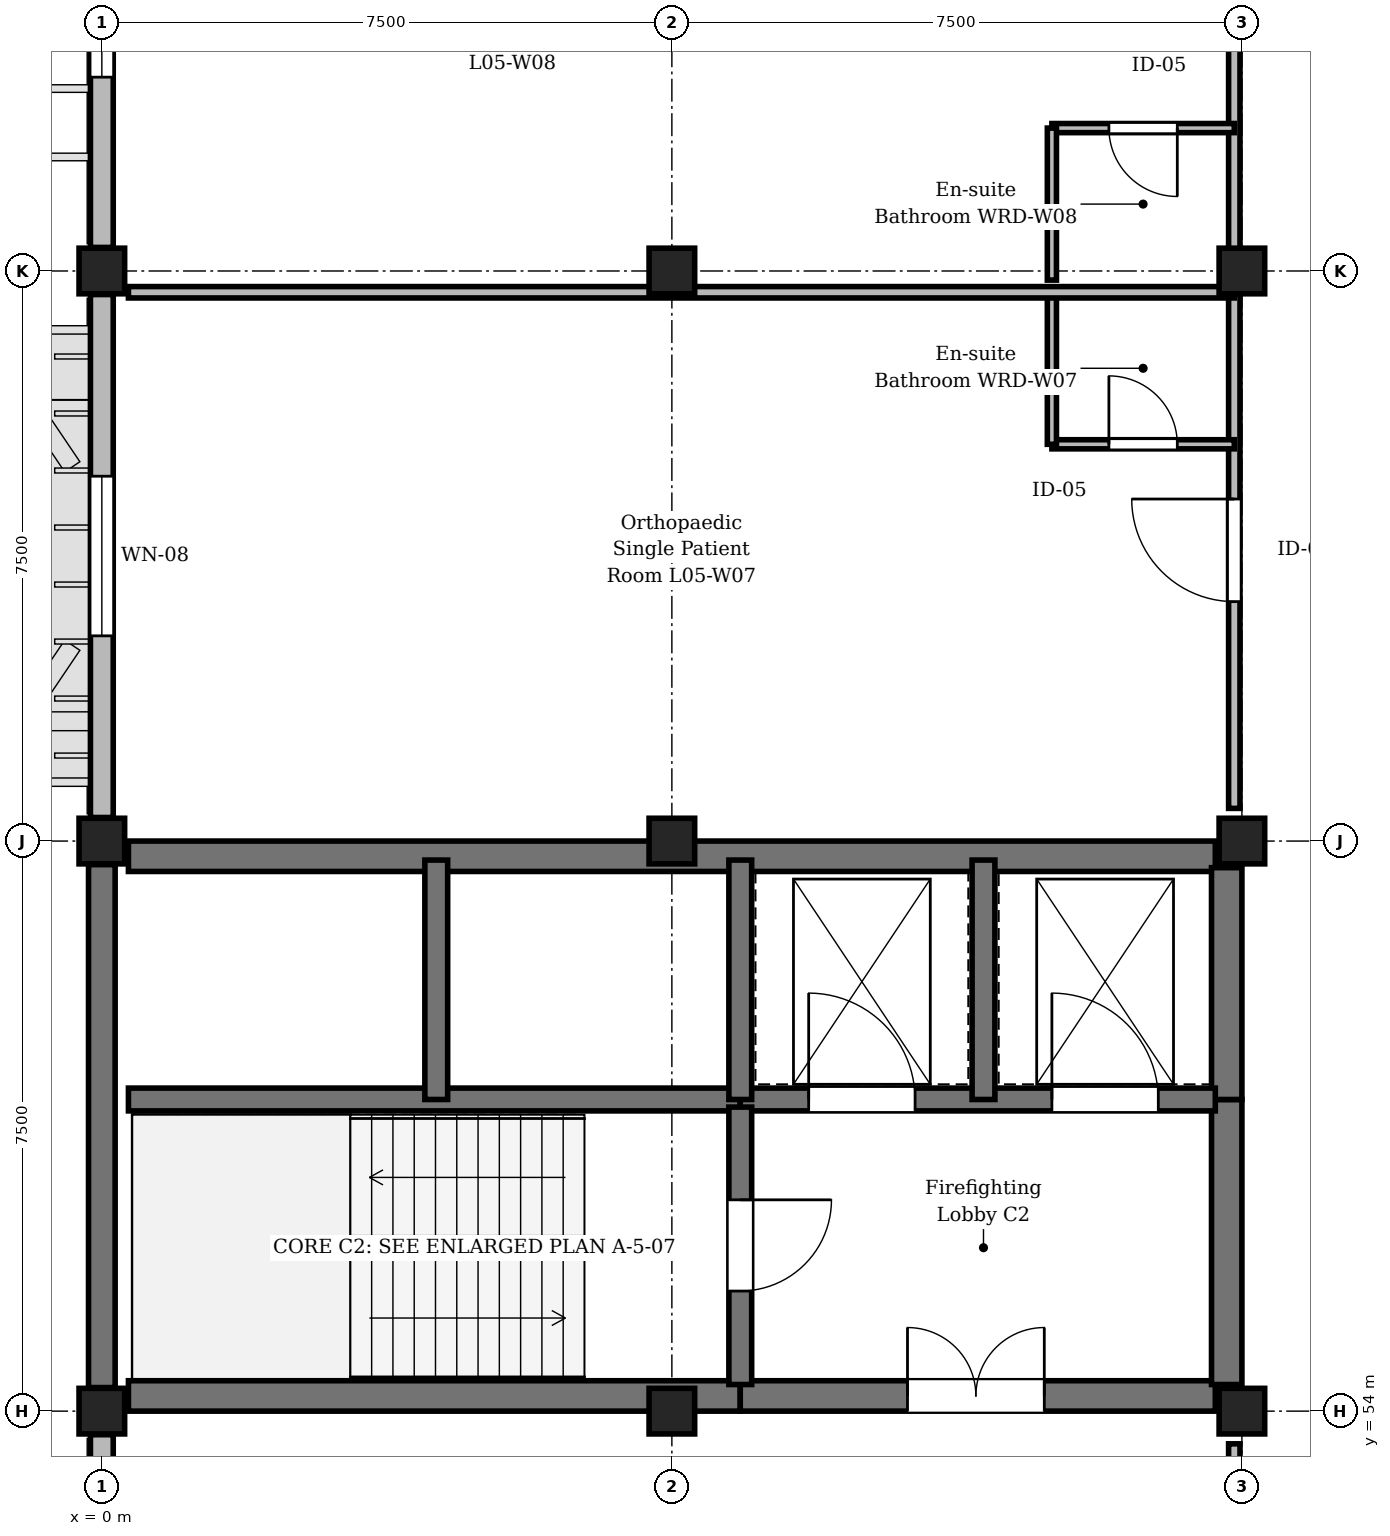
"""IFC4 building model, lengths in metres.
Left out: names, types, materials, properties, quantities, classifications, styles, units other than length and angle.
Written with IfcOpenShell. Run it as: python <this file> out.ifc"""

import sys

from ifc_helpers import new_model, si_unit, direction, frame, frame_2d, origin, origin_2d, place, context, subcontext, project, spatial, rectangle, circle, extrude, element, fill, save


model = new_model("IFC4")
c1 = context("Model", 3, precision=1e-05, world=origin(), true_north=direction((0.0, 1.0)))
c2 = subcontext(c1, "Body", "Model", "MODEL_VIEW")
j1 = project(units=[si_unit("LENGTHUNIT", "METRE"), si_unit("PLANEANGLEUNIT", "RADIAN")], contexts=[c1])
p1 = place(None, origin())
s1 = spatial("IfcSite", under=j1, at=p1, CompositionType="ELEMENT")
p2 = place(p1, origin())
s2 = spatial("IfcBuilding", under=s1, at=p2, CompositionType="ELEMENT")
p3 = place(p2, frame((0.0, 0.0, 21.9)))
s3 = spatial("IfcBuildingStorey", under=s2, at=p3, CompositionType="ELEMENT", Elevation=21.9)
for number, where, z_axis, x_axis in (
    (1, (0.0, 54.0, 0.0), (0.0, 0.0, 1.0), (1.0, 0.0, 0.0)),
    (2, (0.0, 61.5, 0.0), (0.0, 0.0, 1.0), (1.0, 0.0, 0.0)),
):
    element("IfcColumn", number, at=place(p3, frame(where, z_axis=z_axis, x_axis=x_axis)), inside=s3, PredefinedType="COLUMN", context=c2, shape_type="SweptSolid", body=[
        extrude(rectangle(XDim=0.6, YDim=0.6, at=origin_2d()), origin(), (0.0, 0.0, 1.0), 4.05),
    ])
p4 = place(p3, frame((0.0, 69.0, 0.0), z_axis=(0.0, 0.0, 1.0), x_axis=(1.0, 0.0, 0.0)))
e3 = element("IfcColumn", 3, at=p4, inside=s3, PredefinedType="COLUMN", context=c2, shape_type="SweptSolid", body=[
    extrude(circle(Radius=0.3, at=origin_2d()), origin(), (0.0, 0.0, 1.0), 4.05),
])
p5 = place(p3, frame((7.5, 54.0, 0.0), z_axis=(0.0, 0.0, 1.0), x_axis=(1.0, 0.0, 0.0)))
e4 = element("IfcColumn", 4, at=p5, inside=s3, PredefinedType="COLUMN", context=c2, shape_type="SweptSolid", body=[
    extrude(rectangle(XDim=0.6, YDim=0.6, at=origin_2d()), origin(), (0.0, 0.0, 1.0), 4.05),
])
p6 = place(p3, frame((7.5, 61.5, 0.0), z_axis=(0.0, 0.0, 1.0), x_axis=(1.0, 0.0, 0.0)))
e5 = element("IfcColumn", 5, at=p6, inside=s3, PredefinedType="COLUMN", context=c2, shape_type="SweptSolid", body=[
    extrude(circle(Radius=0.3, at=origin_2d()), origin(), (0.0, 0.0, 1.0), 4.05),
])
p7 = place(p3, frame((7.5, 69.0, 0.0), z_axis=(0.0, 0.0, 1.0), x_axis=(1.0, 0.0, 0.0)))
e6 = element("IfcColumn", 6, at=p7, inside=s3, PredefinedType="COLUMN", context=c2, shape_type="SweptSolid", body=[
    extrude(rectangle(XDim=0.6, YDim=0.6, at=origin_2d()), origin(), (0.0, 0.0, 1.0), 4.05),
])
p8 = place(p3, frame((15.0, 54.0, 0.0), z_axis=(0.0, 0.0, 1.0), x_axis=(1.0, 0.0, 0.0)))
e7 = element("IfcColumn", 7, at=p8, inside=s3, PredefinedType="COLUMN", context=c2, shape_type="SweptSolid", body=[
    extrude(circle(Radius=0.3, at=origin_2d()), origin(), (0.0, 0.0, 1.0), 4.05),
])
for number, where, z_axis, x_axis in (
    (8, (15.0, 61.5, 0.0), (0.0, 0.0, 1.0), (1.0, 0.0, 0.0)),
    (9, (15.0, 69.0, 0.0), (0.0, 0.0, 1.0), (1.0, 0.0, 0.0)),
):
    element("IfcColumn", number, at=place(p3, frame(where, z_axis=z_axis, x_axis=x_axis)), inside=s3, PredefinedType="COLUMN", context=c2, shape_type="SweptSolid", body=[
        extrude(rectangle(XDim=0.6, YDim=0.6, at=origin_2d()), origin(), (0.0, 0.0, 1.0), 4.05),
    ])
p9 = place(p3, frame((0.0, 46.81, 0.0), z_axis=(0.0, 0.0, 1.0), x_axis=(0.0, 1.0, 0.0)))
e10 = element("IfcWall", 10, at=p9, inside=s3, PredefinedType="STANDARD", context=c2, shape_type="SweptSolid", body=[
    extrude(rectangle(XDim=6.88, YDim=0.3, at=frame_2d((3.44, 0.0))), origin(), (0.0, 0.0, 1.0), 3.17),
])
p10 = place(p9, frame((2.69, 0.0, 0.9)))
e11 = element("IfcOpeningElement", 11, at=p10, cuts=e10, PredefinedType="OPENING", context=c2, shape_type="SweptSolid", body=[
    extrude(rectangle(XDim=1.5, YDim=1.99, at=frame_2d((0.75, 0.995))), frame((0.0, 0.16, 0.0), z_axis=(0.0, -1.0, 0.0), x_axis=(1.0, 0.0, 0.0)), (0.0, 0.0, 1.0), 0.32),
])
p11 = place(p3, frame((0.0, 54.31, 0.0), z_axis=(0.0, 0.0, 1.0), x_axis=(0.0, 1.0, 0.0)))
e12 = element("IfcWall", 12, at=p11, inside=s3, PredefinedType="SHEAR", context=c2, shape_type="SweptSolid", body=[
    extrude(rectangle(XDim=6.88, YDim=0.35, at=frame_2d((3.44, 0.0))), origin(), (0.0, 0.0, 1.0), 3.77),
])
p12 = place(p3, frame((0.0, 61.81, 0.0), z_axis=(0.0, 0.0, 1.0), x_axis=(0.0, 1.0, 0.0)))
e13 = element("IfcWall", 13, at=p12, inside=s3, PredefinedType="STANDARD", context=c2, shape_type="SweptSolid", body=[
    extrude(rectangle(XDim=6.88, YDim=0.3, at=frame_2d((3.44, 0.0))), origin(), (0.0, 0.0, 1.0), 3.17),
])
p13 = place(p12, frame((2.39, 0.0, 0.9)))
e14 = element("IfcOpeningElement", 14, at=p13, cuts=e13, PredefinedType="OPENING", context=c2, shape_type="SweptSolid", body=[
    extrude(rectangle(XDim=2.1, YDim=1.99, at=frame_2d((1.05, 0.995))), frame((0.0, 0.16, 0.0), z_axis=(0.0, -1.0, 0.0), x_axis=(1.0, 0.0, 0.0)), (0.0, 0.0, 1.0), 0.32),
])
p14 = place(p3, frame((0.0, 69.31, 0.0), z_axis=(0.0, 0.0, 1.0), x_axis=(0.0, 1.0, 0.0)))
e15 = element("IfcWall", 15, at=p14, inside=s3, PredefinedType="STANDARD", context=c2, shape_type="SweptSolid", body=[
    extrude(rectangle(XDim=6.88, YDim=0.3, at=frame_2d((3.44, 0.0))), origin(), (0.0, 0.0, 1.0), 3.17),
])
p15 = place(p14, frame((2.24, 0.0, 0.9)))
e16 = element("IfcOpeningElement", 16, at=p15, cuts=e15, PredefinedType="OPENING", context=c2, shape_type="SweptSolid", body=[
    extrude(rectangle(XDim=2.4, YDim=1.99, at=frame_2d((1.2, 0.995))), frame((0.0, 0.16, 0.0), z_axis=(0.0, -1.0, 0.0), x_axis=(1.0, 0.0, 0.0)), (0.0, 0.0, 1.0), 0.32),
])
p16 = place(p3, frame((0.35, 54.2, 0.0), z_axis=(0.0, 0.0, 1.0), x_axis=(1.0, 0.0, 0.0)))
e17 = element("IfcWall", 17, at=p16, inside=s3, PredefinedType="SHEAR", context=c2, shape_type="SweptSolid", body=[
    extrude(rectangle(XDim=8.05, YDim=0.4, at=frame_2d((4.025, 0.0))), origin(), (0.0, 0.0, 1.0), 3.77),
])
p17 = place(p3, frame((8.4, 54.2, 0.0), z_axis=(0.0, 0.0, 1.0), x_axis=(1.0, 0.0, 0.0)))
e18 = element("IfcWall", 18, at=p17, inside=s3, PredefinedType="SHEAR", context=c2, shape_type="SweptSolid", body=[
    extrude(rectangle(XDim=6.25, YDim=0.4, at=frame_2d((3.125, 0.0))), origin(), (0.0, 0.0, 1.0), 3.77),
])
p18 = place(p17, frame((2.2, 0.0, 0.0)))
e19 = element("IfcOpeningElement", 19, at=p18, cuts=e18, PredefinedType="OPENING", context=c2, shape_type="SweptSolid", body=[
    extrude(rectangle(XDim=1.8, YDim=2.25, at=frame_2d((0.9, 1.125))), frame((0.0, 0.21, 0.0), z_axis=(0.0, -1.0, 0.0), x_axis=(1.0, 0.0, 0.0)), (0.0, 0.0, 1.0), 0.42),
])
p19 = place(p3, frame((0.35, 61.3, 0.0), z_axis=(0.0, 0.0, 1.0), x_axis=(1.0, 0.0, 0.0)))
e20 = element("IfcWall", 20, at=p19, inside=s3, PredefinedType="SHEAR", context=c2, shape_type="SweptSolid", body=[
    extrude(rectangle(XDim=14.3, YDim=0.4, at=frame_2d((7.15, 0.0))), origin(), (0.0, 0.0, 1.0), 3.77),
])
p20 = place(p3, frame((14.8, 54.35, 0.0), z_axis=(0.0, 0.0, 1.0), x_axis=(0.0, 1.0, 0.0)))
e21 = element("IfcWall", 21, at=p20, inside=s3, PredefinedType="SHEAR", context=c2, shape_type="SweptSolid", body=[
    extrude(rectangle(XDim=3.75, YDim=0.4, at=frame_2d((1.875, 0.0))), origin(), (0.0, 0.0, 1.0), 3.77),
])
p21 = place(p3, frame((14.8, 58.1, 0.0), z_axis=(0.0, 0.0, 1.0), x_axis=(0.0, 1.0, 0.0)))
e22 = element("IfcWall", 22, at=p21, inside=s3, PredefinedType="SHEAR", context=c2, shape_type="SweptSolid", body=[
    extrude(rectangle(XDim=3.05, YDim=0.4, at=frame_2d((1.525, 0.0))), origin(), (0.0, 0.0, 1.0), 3.77),
])
p22 = place(p3, frame((0.35, 58.1, 0.0), z_axis=(0.0, 0.0, 1.0), x_axis=(1.0, 0.0, 0.0)))
e23 = element("IfcWall", 23, at=p22, inside=s3, PredefinedType="SHEAR", context=c2, shape_type="SweptSolid", body=[
    extrude(rectangle(XDim=8.05, YDim=0.3, at=frame_2d((4.025, 0.0))), origin(), (0.0, 0.0, 1.0), 3.77),
])
p23 = place(p3, frame((8.4, 58.1, 0.0), z_axis=(0.0, 0.0, 1.0), x_axis=(1.0, 0.0, 0.0)))
e24 = element("IfcWall", 24, at=p23, inside=s3, PredefinedType="SHEAR", context=c2, shape_type="SweptSolid", body=[
    extrude(rectangle(XDim=6.25, YDim=0.3, at=frame_2d((3.125, 0.0))), origin(), (0.0, 0.0, 1.0), 3.77),
])
p24 = place(p23, frame((0.9, 0.0, 0.0)))
e25 = element("IfcOpeningElement", 25, at=p24, cuts=e24, PredefinedType="OPENING", context=c2, shape_type="SweptSolid", body=[
    extrude(rectangle(XDim=1.4, YDim=2.25, at=frame_2d((0.7, 1.125))), frame((0.0, 0.16, 0.0), z_axis=(0.0, -1.0, 0.0), x_axis=(1.0, 0.0, 0.0)), (0.0, 0.0, 1.0), 0.32),
])
p25 = place(p23, frame((4.1, 0.0, 0.0)))
e26 = element("IfcOpeningElement", 26, at=p25, cuts=e24, PredefinedType="OPENING", context=c2, shape_type="SweptSolid", body=[
    extrude(rectangle(XDim=1.4, YDim=2.25, at=frame_2d((0.7, 1.125))), frame((0.0, 0.16, 0.0), z_axis=(0.0, -1.0, 0.0), x_axis=(1.0, 0.0, 0.0)), (0.0, 0.0, 1.0), 0.32),
])
p26 = place(p3, frame((8.4, 58.0, 0.0), z_axis=(0.0, 0.0, 1.0), x_axis=(0.0, -1.0, 0.0)))
e27 = element("IfcWall", 27, at=p26, inside=s3, PredefinedType="SHEAR", context=c2, shape_type="SweptSolid", body=[
    extrude(rectangle(XDim=3.65, YDim=0.3, at=frame_2d((1.825, 0.0))), origin(), (0.0, 0.0, 1.0), 3.77),
])
p27 = place(p26, frame((1.22, 0.0, 0.0)))
e28 = element("IfcOpeningElement", 28, at=p27, cuts=e27, PredefinedType="OPENING", context=c2, shape_type="SweptSolid", body=[
    extrude(rectangle(XDim=1.2, YDim=2.25, at=frame_2d((0.6, 1.125))), frame((0.0, 0.16, 0.0), z_axis=(0.0, -1.0, 0.0), x_axis=(1.0, 0.0, 0.0)), (0.0, 0.0, 1.0), 0.32),
])
for number, where, z_axis, x_axis in (
    (29, (4.4, 58.1, 0.0), (0.0, 0.0, 1.0), (0.0, 1.0, 0.0)),
    (30, (8.4, 58.1, 0.0), (0.0, 0.0, 1.0), (0.0, 1.0, 0.0)),
    (31, (11.6, 58.1, 0.0), (0.0, 0.0, 1.0), (0.0, 1.0, 0.0)),
):
    element("IfcWall", number, at=place(p3, frame(where, z_axis=z_axis, x_axis=x_axis)), inside=s3, PredefinedType="SHEAR", context=c2, shape_type="SweptSolid", body=[
        extrude(rectangle(XDim=3.15, YDim=0.3, at=frame_2d((1.575, 0.0))), origin(), (0.0, 0.0, 1.0), 3.77),
    ])
p28 = place(p3, frame((14.9, 46.07, 0.0), z_axis=(0.0, 0.0, 1.0), x_axis=(0.0, 1.0, 0.0)))
e32 = element("IfcWall", 32, at=p28, inside=s3, PredefinedType="PARTITIONING", context=c2, shape_type="SweptSolid", body=[
    extrude(rectangle(XDim=7.5, YDim=0.15, at=frame_2d((3.75, 0.0))), origin(), (0.0, 0.0, 1.0), 3.205),
])
p29 = place(p28, frame((3.64, 0.0, 0.0)))
e33 = element("IfcOpeningElement", 33, at=p29, cuts=e32, PredefinedType="OPENING", context=c2, shape_type="SweptSolid", body=[
    extrude(rectangle(XDim=1.35, YDim=2.25, at=frame_2d((0.675, 1.125))), frame((0.0, 0.085, 0.0), z_axis=(0.0, -1.0, 0.0), x_axis=(1.0, 0.0, 0.0)), (0.0, 0.0, 1.0), 0.17),
])
p30 = place(p3, frame((14.9, 61.93, 0.0), z_axis=(0.0, 0.0, 1.0), x_axis=(0.0, 1.0, 0.0)))
e34 = element("IfcWall", 34, at=p30, inside=s3, PredefinedType="PARTITIONING", context=c2, shape_type="SweptSolid", body=[
    extrude(rectangle(XDim=6.79, YDim=0.15, at=frame_2d((3.395, 0.0))), origin(), (0.0, 0.0, 1.0), 3.205),
])
p31 = place(p30, frame((2.72, 0.0, 0.0)))
e35 = element("IfcOpeningElement", 35, at=p31, cuts=e34, PredefinedType="OPENING", context=c2, shape_type="SweptSolid", body=[
    extrude(rectangle(XDim=1.35, YDim=2.25, at=frame_2d((0.675, 1.125))), frame((0.0, 0.085, 0.0), z_axis=(0.0, -1.0, 0.0), x_axis=(1.0, 0.0, 0.0)), (0.0, 0.0, 1.0), 0.17),
])
p32 = place(p3, frame((12.5, 66.72, 0.0), z_axis=(0.0, 0.0, 1.0), x_axis=(1.0, 0.0, 0.0)))
e36 = element("IfcWall", 36, at=p32, inside=s3, PredefinedType="PARTITIONING", context=c2, shape_type="SweptSolid", body=[
    extrude(rectangle(XDim=2.4, YDim=0.12, at=frame_2d((1.2, 0.0))), origin(), (0.0, 0.0, 1.0), 3.755),
])
p33 = place(p32, frame((0.75, 0.0, 0.0)))
e37 = element("IfcOpeningElement", 37, at=p33, cuts=e36, PredefinedType="OPENING", context=c2, shape_type="SweptSolid", body=[
    extrude(rectangle(XDim=0.9, YDim=2.1, at=frame_2d((0.45, 1.05))), frame((0.0, 0.07, 0.0), z_axis=(0.0, -1.0, 0.0), x_axis=(1.0, 0.0, 0.0)), (0.0, 0.0, 1.0), 0.14),
])
p34 = place(p3, frame((12.5, 66.72, 0.0), z_axis=(0.0, 0.0, 1.0), x_axis=(0.0, 1.0, 0.0)))
e38 = element("IfcWall", 38, at=p34, inside=s3, PredefinedType="PARTITIONING", context=c2, shape_type="SweptSolid", body=[
    extrude(rectangle(XDim=2.0, YDim=0.12, at=frame_2d((1.0, 0.0))), origin(), (0.0, 0.0, 1.0), 3.755),
])
p35 = place(p3, frame((14.9, 68.88, 0.0), z_axis=(0.0, 0.0, 1.0), x_axis=(0.0, 1.0, 0.0)))
e39 = element("IfcWall", 39, at=p35, inside=s3, PredefinedType="PARTITIONING", context=c2, shape_type="SweptSolid", body=[
    extrude(rectangle(XDim=6.79, YDim=0.15, at=frame_2d((3.395, 0.0))), origin(), (0.0, 0.0, 1.0), 3.255),
])
p36 = place(p35, frame((3.154, 0.0, 0.0)))
e40 = element("IfcOpeningElement", 40, at=p36, cuts=e39, PredefinedType="OPENING", context=c2, shape_type="SweptSolid", body=[
    extrude(rectangle(XDim=1.45, YDim=2.3, at=frame_2d((0.725, 1.15))), frame((0.0, 0.085, 0.0), z_axis=(0.0, -1.0, 0.0), x_axis=(1.0, 0.0, 0.0)), (0.0, 0.0, 1.0), 0.17),
])
p37 = place(p3, frame((14.9, 70.88, 0.0), z_axis=(0.0, 0.0, 1.0), x_axis=(-1.0, 0.0, 0.0)))
e41 = element("IfcWall", 41, at=p37, inside=s3, PredefinedType="PARTITIONING", context=c2, shape_type="SweptSolid", body=[
    extrude(rectangle(XDim=2.4, YDim=0.12, at=frame_2d((1.2, 0.0))), origin(), (0.0, 0.0, 1.0), 3.755),
])
p38 = place(p37, frame((0.75, 0.0, 0.0)))
e42 = element("IfcOpeningElement", 42, at=p38, cuts=e41, PredefinedType="OPENING", context=c2, shape_type="SweptSolid", body=[
    extrude(rectangle(XDim=0.9, YDim=2.1, at=frame_2d((0.45, 1.05))), frame((0.0, 0.07, 0.0), z_axis=(0.0, -1.0, 0.0), x_axis=(1.0, 0.0, 0.0)), (0.0, 0.0, 1.0), 0.14),
])
p39 = place(p3, frame((12.5, 68.88, 0.0), z_axis=(0.0, 0.0, 1.0), x_axis=(0.0, 1.0, 0.0)))
e43 = element("IfcWall", 43, at=p39, inside=s3, PredefinedType="PARTITIONING", context=c2, shape_type="SweptSolid", body=[
    extrude(rectangle(XDim=2.0, YDim=0.12, at=frame_2d((1.0, 0.0))), origin(), (0.0, 0.0, 1.0), 3.755),
])
p40 = place(p3, frame((0.35, 68.72, 0.0), z_axis=(0.0, 0.0, 1.0), x_axis=(1.0, 0.0, 0.0)))
e44 = element("IfcWall", 44, at=p40, inside=s3, PredefinedType="PARTITIONING", context=c2, shape_type="SweptSolid", body=[
    extrude(rectangle(XDim=14.55, YDim=0.15, at=frame_2d((7.275, 0.0))), origin(), (0.0, 0.0, 1.0), 3.155),
])
p41 = place(p13, origin())
e45 = element("IfcWindow", 45, at=p41, inside=s3, PartitioningType="SINGLE_PANEL", PredefinedType="WINDOW", context=c2, shape_type="SweptSolid", body=[
    extrude(rectangle(XDim=2.1, YDim=1.99, at=frame_2d((1.05, 0.995))), frame((0.0, 0.03, 0.0), z_axis=(0.0, -1.0, 0.0), x_axis=(1.0, 0.0, 0.0)), (0.0, 0.0, 1.0), 0.06),
])
fill(e14, e45)
p42 = place(p15, origin())
e46 = element("IfcWindow", 46, at=p42, inside=s3, PartitioningType="SINGLE_PANEL", PredefinedType="WINDOW", context=c2, shape_type="SweptSolid", body=[
    extrude(rectangle(XDim=2.4, YDim=1.99, at=frame_2d((1.2, 0.995))), frame((0.0, 0.03, 0.0), z_axis=(0.0, -1.0, 0.0), x_axis=(1.0, 0.0, 0.0)), (0.0, 0.0, 1.0), 0.06),
])
fill(e16, e46)
p43 = place(p18, origin())
e47 = element("IfcDoor", 47, at=p43, inside=s3, OperationType="DOUBLE_DOOR_SINGLE_SWING", PredefinedType="DOOR", context=c2, shape_type="SweptSolid", body=[
    extrude(rectangle(XDim=1.8, YDim=2.25, at=frame_2d((0.9, 1.125))), frame((0.0, 0.025, 0.0), z_axis=(0.0, -1.0, 0.0), x_axis=(1.0, 0.0, 0.0)), (0.0, 0.0, 1.0), 0.05),
])
fill(e19, e47)
p44 = place(p24, origin())
e48 = element("IfcDoor", 48, at=p44, inside=s3, OperationType="DOUBLE_DOOR_SLIDING", PredefinedType="DOOR", context=c2, shape_type="SweptSolid", body=[
    extrude(rectangle(XDim=1.4, YDim=2.25, at=frame_2d((0.7, 1.125))), frame((0.0, 0.025, 0.0), z_axis=(0.0, -1.0, 0.0), x_axis=(1.0, 0.0, 0.0)), (0.0, 0.0, 1.0), 0.05),
])
fill(e25, e48)
p45 = place(p25, origin())
e49 = element("IfcDoor", 49, at=p45, inside=s3, OperationType="DOUBLE_DOOR_SLIDING", PredefinedType="DOOR", context=c2, shape_type="SweptSolid", body=[
    extrude(rectangle(XDim=1.4, YDim=2.25, at=frame_2d((0.7, 1.125))), frame((0.0, 0.025, 0.0), z_axis=(0.0, -1.0, 0.0), x_axis=(1.0, 0.0, 0.0)), (0.0, 0.0, 1.0), 0.05),
])
fill(e26, e49)
p46 = place(p27, origin())
e50 = element("IfcDoor", 50, at=p46, inside=s3, OperationType="SINGLE_SWING_LEFT", PredefinedType="DOOR", context=c2, shape_type="SweptSolid", body=[
    extrude(rectangle(XDim=1.2, YDim=2.25, at=frame_2d((0.6, 1.125))), frame((0.0, 0.025, 0.0), z_axis=(0.0, -1.0, 0.0), x_axis=(1.0, 0.0, 0.0)), (0.0, 0.0, 1.0), 0.05),
])
fill(e28, e50)
p47 = place(p31, origin())
e51 = element("IfcDoor", 51, at=p47, inside=s3, OperationType="SINGLE_SWING_RIGHT", PredefinedType="DOOR", context=c2, shape_type="SweptSolid", body=[
    extrude(rectangle(XDim=1.35, YDim=2.25, at=frame_2d((0.675, 1.125))), frame((0.0, 0.025, 0.0), z_axis=(0.0, -1.0, 0.0), x_axis=(1.0, 0.0, 0.0)), (0.0, 0.0, 1.0), 0.05),
])
fill(e35, e51)
p48 = place(p33, origin())
e52 = element("IfcDoor", 52, at=p48, inside=s3, OperationType="SINGLE_SWING_LEFT", PredefinedType="DOOR", context=c2, shape_type="SweptSolid", body=[
    extrude(rectangle(XDim=0.9, YDim=2.1, at=frame_2d((0.45, 1.05))), frame((0.0, 0.025, 0.0), z_axis=(0.0, -1.0, 0.0), x_axis=(1.0, 0.0, 0.0)), (0.0, 0.0, 1.0), 0.05),
])
fill(e37, e52)
p49 = place(p38, origin())
e53 = element("IfcDoor", 53, at=p49, inside=s3, OperationType="SINGLE_SWING_LEFT", PredefinedType="DOOR", context=c2, shape_type="SweptSolid", body=[
    extrude(rectangle(XDim=0.9, YDim=2.1, at=frame_2d((0.45, 1.05))), frame((0.0, 0.025, 0.0), z_axis=(0.0, -1.0, 0.0), x_axis=(1.0, 0.0, 0.0)), (0.0, 0.0, 1.0), 0.05),
])
fill(e42, e53)
save(model, sys.argv[1])
